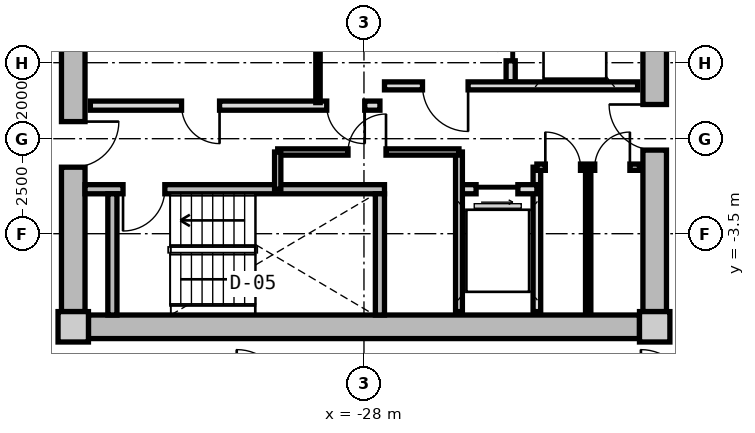
"""IFC4 building model, lengths in metres.
Left out: names, types, materials, properties, quantities, classifications, styles, units other than length and angle.
Written with IfcOpenShell. Run it as: python <this file> out.ifc"""

import sys

from ifc_helpers import new_model, si_unit, direction, frame, frame_2d, origin, origin_2d, place, context, subcontext, project, spatial, rectangle, extrude, source, transform, mapped, element, fill, save


model = new_model("IFC4")
c1 = context("Model", 3, precision=1e-05, world=origin(), true_north=direction((0.0, 1.0)))
c2 = subcontext(c1, "Body", "Model", "MODEL_VIEW")
j1 = project(units=[si_unit("LENGTHUNIT", "METRE"), si_unit("PLANEANGLEUNIT", "RADIAN")], contexts=[c1])
p1 = place(None, origin())
s1 = spatial("IfcSite", under=j1, at=p1, CompositionType="ELEMENT")
p2 = place(p1, origin())
s2 = spatial("IfcBuilding", under=s1, at=p2, CompositionType="ELEMENT")
p3 = place(p2, frame((0.0, 0.0, 180.05)))
s3 = spatial("IfcBuildingStorey", under=s2, at=p3, CompositionType="ELEMENT", Elevation=180.05)
m1 = source(origin(), c2, "Body", "SweptSolid", [
    extrude(rectangle(XDim=0.8, YDim=0.8, at=origin_2d()), origin(), (0.0, 0.0, 1.0), 3.05),
])
for number, where, z_axis, x_axis in (
    (1, (-35.65, -5.95, 0.0), (0.0, 0.0, 1.0), (1.0, 0.0, 0.0)),
    (2, (-20.35, -5.95, 0.0), (0.0, 0.0, 1.0), (1.0, 0.0, 0.0)),
):
    element("IfcColumn", number, at=place(p3, frame(where, z_axis=z_axis, x_axis=x_axis)), inside=s3, PredefinedType="COLUMN", context=c2, shape_type="MappedRepresentation", body=[
        mapped(m1, transform((0.0, 0.0, 0.0), x_axis=(1.0, 0.0, 0.0), y_axis=(0.0, 1.0, 0.0), z_axis=(0.0, 0.0, 1.0), scale=1.0)),
    ])
m2 = source(origin(), c2, "Body", "SweptSolid", [
    extrude(rectangle(XDim=14.5, YDim=0.62, at=frame_2d((7.25, 0.0))), origin(), (0.0, 0.0, 1.0), 2.81),
])
p4 = place(p3, frame((-20.75, -5.95, 0.0), z_axis=(0.0, 0.0, 1.0), x_axis=(-1.0, 0.0, 0.0)))
e3 = element("IfcWall", 3, at=p4, inside=s3, PredefinedType="SHEAR", context=c2, shape_type="MappedRepresentation", body=[
    mapped(m2, transform((0.0, 0.0, 0.0), x_axis=(1.0, 0.0, 0.0), y_axis=(0.0, 1.0, 0.0), z_axis=(0.0, 0.0, 1.0), scale=1.0)),
])
m3 = source(origin(), c2, "Body", "SweptSolid", [
    extrude(rectangle(XDim=11.1, YDim=0.62, at=frame_2d((5.55, 0.0))), origin(), (0.0, 0.0, 1.0), 2.81),
])
p5 = place(p3, frame((-35.65, -5.55, 0.0), z_axis=(0.0, 0.0, 1.0), x_axis=(0.0, 1.0, 0.0)))
e4 = element("IfcWall", 4, at=p5, inside=s3, PredefinedType="SHEAR", context=c2, shape_type="MappedRepresentation", body=[
    mapped(m3, transform((0.0, 0.0, 0.0), x_axis=(1.0, 0.0, 0.0), y_axis=(0.0, 1.0, 0.0), z_axis=(0.0, 0.0, 1.0), scale=1.0)),
])
p6 = place(p5, frame((3.8, 0.0, 0.0)))
e5 = element("IfcOpeningElement", 5, at=p6, cuts=e4, PredefinedType="OPENING", context=c2, shape_type="SweptSolid", body=[
    extrude(rectangle(XDim=1.2, YDim=2.15, at=frame_2d((0.6, 1.075))), frame((0.0, 0.32, 0.0), z_axis=(0.0, -1.0, 0.0), x_axis=(1.0, 0.0, 0.0)), (0.0, 0.0, 1.0), 0.64),
])
p7 = place(p3, frame((-20.35, 5.55, 0.0), z_axis=(0.0, 0.0, 1.0), x_axis=(0.0, -1.0, 0.0)))
e6 = element("IfcWall", 6, at=p7, inside=s3, PredefinedType="SHEAR", context=c2, shape_type="MappedRepresentation", body=[
    mapped(m3, transform((0.0, 0.0, 0.0), x_axis=(1.0, 0.0, 0.0), y_axis=(0.0, 1.0, 0.0), z_axis=(0.0, 0.0, 1.0), scale=1.0)),
])
p8 = place(p7, frame((5.65, 0.0, 0.0)))
e7 = element("IfcOpeningElement", 7, at=p8, cuts=e6, PredefinedType="OPENING", context=c2, shape_type="SweptSolid", body=[
    extrude(rectangle(XDim=1.2, YDim=2.15, at=frame_2d((0.6, 1.075))), frame((0.0, 0.32, 0.0), z_axis=(0.0, -1.0, 0.0), x_axis=(1.0, 0.0, 0.0)), (0.0, 0.0, 1.0), 0.64),
])
m4 = source(origin(), c2, "Body", "SweptSolid", [
    extrude(rectangle(XDim=7.88, YDim=0.24, at=frame_2d((3.94, 0.0))), origin(), (0.0, 0.0, 1.0), 2.81),
])
p9 = place(p3, frame((-35.34, -2.33, 0.0), z_axis=(0.0, 0.0, 1.0), x_axis=(1.0, 0.0, 0.0)))
e8 = element("IfcWall", 8, at=p9, inside=s3, PredefinedType="PARTITIONING", context=c2, shape_type="MappedRepresentation", body=[
    mapped(m4, transform((0.0, 0.0, 0.0), x_axis=(1.0, 0.0, 0.0), y_axis=(0.0, 1.0, 0.0), z_axis=(0.0, 0.0, 1.0), scale=1.0)),
])
p10 = place(p9, frame((1.0, 0.0, 0.0)))
e9 = element("IfcOpeningElement", 9, at=p10, cuts=e8, PredefinedType="OPENING", context=c2, shape_type="SweptSolid", body=[
    extrude(rectangle(XDim=1.1, YDim=2.15, at=frame_2d((0.55, 1.075))), frame((0.0, 0.13, 0.0), z_axis=(0.0, -1.0, 0.0), x_axis=(1.0, 0.0, 0.0)), (0.0, 0.0, 1.0), 0.26),
])
m5 = source(origin(), c2, "Body", "SweptSolid", [
    extrude(rectangle(XDim=3.19, YDim=0.24, at=frame_2d((1.595, 0.0))), origin(), (0.0, 0.0, 1.0), 2.81),
])
for number, where, z_axis, x_axis in (
    (10, (-34.62, -5.64, 0.0), (0.0, 0.0, 1.0), (0.0, 1.0, 0.0)),
    (11, (-27.58, -5.64, 0.0), (0.0, 0.0, 1.0), (0.0, 1.0, 0.0)),
):
    element("IfcWall", number, at=place(p3, frame(where, z_axis=z_axis, x_axis=x_axis)), inside=s3, PredefinedType="PARTITIONING", context=c2, shape_type="MappedRepresentation", body=[
        mapped(m5, transform((0.0, 0.0, 0.0), x_axis=(1.0, 0.0, 0.0), y_axis=(0.0, 1.0, 0.0), z_axis=(0.0, 0.0, 1.0), scale=1.0)),
    ])
m6 = source(origin(), c2, "Body", "SweptSolid", [
    extrude(rectangle(XDim=5.0, YDim=0.24, at=frame_2d((2.5, 0.0))), origin(), (0.0, 0.0, 1.0), 2.795),
])
p11 = place(p3, frame((-24.14, 0.5, 0.0), z_axis=(0.0, 0.0, 1.0), x_axis=(0.0, 1.0, 0.0)))
e12 = element("IfcWall", 12, at=p11, inside=s3, PredefinedType="PARTITIONING", context=c2, shape_type="MappedRepresentation", body=[
    mapped(m6, transform((0.0, 0.0, 0.0), x_axis=(1.0, 0.0, 0.0), y_axis=(0.0, 1.0, 0.0), z_axis=(0.0, 0.0, 1.0), scale=1.0)),
])
p12 = place(p11, frame((3.05, 0.0, 0.0)))
e13 = element("IfcOpeningElement", 13, at=p12, cuts=e12, PredefinedType="OPENING", context=c2, shape_type="SweptSolid", body=[
    extrude(rectangle(XDim=1.3, YDim=2.2, at=frame_2d((0.65, 1.1))), frame((0.0, 0.13, 0.0), z_axis=(0.0, -1.0, 0.0), x_axis=(1.0, 0.0, 0.0)), (0.0, 0.0, 1.0), 0.26),
])
p13 = place(p11, frame((0.55, 0.0, 0.0)))
e14 = element("IfcOpeningElement", 14, at=p13, cuts=e12, PredefinedType="OPENING", context=c2, shape_type="SweptSolid", body=[
    extrude(rectangle(XDim=1.3, YDim=2.2, at=frame_2d((0.65, 1.1))), frame((0.0, 0.13, 0.0), z_axis=(0.0, -1.0, 0.0), x_axis=(1.0, 0.0, 0.0)), (0.0, 0.0, 1.0), 0.26),
])
m7 = source(origin(), c2, "Body", "SweptSolid", [
    extrude(rectangle(XDim=6.66, YDim=0.21, at=frame_2d((3.33, 0.0))), origin(), (0.0, 0.0, 1.0), 2.795),
])
p14 = place(p3, frame((-27.46, 0.39, 0.0), z_axis=(0.0, 0.0, 1.0), x_axis=(1.0, 0.0, 0.0)))
e15 = element("IfcWall", 15, at=p14, inside=s3, PredefinedType="PARTITIONING", context=c2, shape_type="MappedRepresentation", body=[
    mapped(m7, transform((0.0, 0.0, 0.0), x_axis=(1.0, 0.0, 0.0), y_axis=(0.0, 1.0, 0.0), z_axis=(0.0, 0.0, 1.0), scale=1.0)),
])
p15 = place(p14, frame((1.0, 0.0, 0.0)))
e16 = element("IfcOpeningElement", 16, at=p15, cuts=e15, PredefinedType="OPENING", context=c2, shape_type="SweptSolid", body=[
    extrude(rectangle(XDim=1.2, YDim=2.15, at=frame_2d((0.6, 1.075))), frame((0.0, 0.115, 0.0), z_axis=(0.0, -1.0, 0.0), x_axis=(1.0, 0.0, 0.0)), (0.0, 0.0, 1.0), 0.23),
])
m8 = source(origin(), c2, "Body", "SweptSolid", [
    extrude(rectangle(XDim=7.62, YDim=0.24, at=frame_2d((3.81, 0.0))), origin(), (0.0, 0.0, 1.0), 2.795),
])
p16 = place(p3, frame((-35.2, -0.13, 0.0), z_axis=(0.0, 0.0, 1.0), x_axis=(1.0, 0.0, 0.0)))
e17 = element("IfcWall", 17, at=p16, inside=s3, PredefinedType="PARTITIONING", context=c2, shape_type="MappedRepresentation", body=[
    mapped(m8, transform((0.0, 0.0, 0.0), x_axis=(1.0, 0.0, 0.0), y_axis=(0.0, 1.0, 0.0), z_axis=(0.0, 0.0, 1.0), scale=1.0)),
])
p17 = place(p16, frame((6.22, 0.0, 0.0)))
e18 = element("IfcOpeningElement", 18, at=p17, cuts=e17, PredefinedType="OPENING", context=c2, shape_type="SweptSolid", body=[
    extrude(rectangle(XDim=1.0, YDim=2.1, at=frame_2d((0.5, 1.05))), frame((0.0, 0.13, 0.0), z_axis=(0.0, -1.0, 0.0), x_axis=(1.0, 0.0, 0.0)), (0.0, 0.0, 1.0), 0.26),
])
p18 = place(p16, frame((2.4, 0.0, 0.0)))
e19 = element("IfcOpeningElement", 19, at=p18, cuts=e17, PredefinedType="OPENING", context=c2, shape_type="SweptSolid", body=[
    extrude(rectangle(XDim=1.0, YDim=2.1, at=frame_2d((0.5, 1.05))), frame((0.0, 0.13, 0.0), z_axis=(0.0, -1.0, 0.0), x_axis=(1.0, 0.0, 0.0)), (0.0, 0.0, 1.0), 0.26),
])
m9 = source(origin(), c2, "Body", "SweptSolid", [
    extrude(rectangle(XDim=2.33, YDim=0.115, at=frame_2d((1.165, 0.0))), origin(), (0.0, 0.0, 1.0), 2.795),
])
p19 = place(p3, frame((-29.21, -0.05, 0.0), z_axis=(0.0, 0.0, 1.0), x_axis=(0.0, 1.0, 0.0)))
e20 = element("IfcWall", 20, at=p19, inside=s3, PredefinedType="PARTITIONING", context=c2, shape_type="MappedRepresentation", body=[
    mapped(m9, transform((0.0, 0.0, 0.0), x_axis=(1.0, 0.0, 0.0), y_axis=(0.0, 1.0, 0.0), z_axis=(0.0, 0.0, 1.0), scale=1.0)),
])
m10 = source(origin(), c2, "Body", "SweptSolid", [
    extrude(rectangle(XDim=3.8, YDim=0.2, at=frame_2d((1.9, 0.0))), origin(), (0.0, 0.0, 1.0), 2.795),
])
p20 = place(p3, frame((-23.45, -5.55, 0.0), z_axis=(0.0, 0.0, 1.0), x_axis=(0.0, 1.0, 0.0)))
e21 = element("IfcWall", 21, at=p20, inside=s3, PredefinedType="PARTITIONING", context=c2, shape_type="MappedRepresentation", body=[
    mapped(m10, transform((0.0, 0.0, 0.0), x_axis=(1.0, 0.0, 0.0), y_axis=(0.0, 1.0, 0.0), z_axis=(0.0, 0.0, 1.0), scale=1.0)),
])
m11 = source(origin(), c2, "Body", "SweptSolid", [
    extrude(rectangle(XDim=2.05, YDim=0.24, at=frame_2d((1.025, 0.0))), origin(), (0.0, 0.0, 1.0), 2.795),
])
p21 = place(p3, frame((-25.5, -2.33, 0.0), z_axis=(0.0, 0.0, 1.0), x_axis=(1.0, 0.0, 0.0)))
e22 = element("IfcWall", 22, at=p21, inside=s3, PredefinedType="PARTITIONING", context=c2, shape_type="MappedRepresentation", body=[
    mapped(m11, transform((0.0, 0.0, 0.0), x_axis=(1.0, 0.0, 0.0), y_axis=(0.0, 1.0, 0.0), z_axis=(0.0, 0.0, 1.0), scale=1.0)),
])
p22 = place(p21, frame((0.45, 0.0, 0.0)))
e23 = element("IfcOpeningElement", 23, at=p22, cuts=e22, PredefinedType="OPENING", context=c2, shape_type="SweptSolid", body=[
    extrude(rectangle(XDim=1.1, YDim=2.2, at=frame_2d((0.55, 1.1))), frame((0.0, 0.13, 0.0), z_axis=(0.0, -1.0, 0.0), x_axis=(1.0, 0.0, 0.0)), (0.0, 0.0, 1.0), 0.26),
])
m12 = source(origin(), c2, "Body", "SweptSolid", [
    extrude(rectangle(XDim=4.2, YDim=0.18, at=frame_2d((2.1, 0.0))), origin(), (0.0, 0.0, 1.0), 2.795),
])
p23 = place(p3, frame((-25.5, -5.55, 0.0), z_axis=(0.0, 0.0, 1.0), x_axis=(0.0, 1.0, 0.0)))
e24 = element("IfcWall", 24, at=p23, inside=s3, PredefinedType="PARTITIONING", context=c2, shape_type="MappedRepresentation", body=[
    mapped(m12, transform((0.0, 0.0, 0.0), x_axis=(1.0, 0.0, 0.0), y_axis=(0.0, 1.0, 0.0), z_axis=(0.0, 0.0, 1.0), scale=1.0)),
])
m13 = source(origin(), c2, "Body", "SweptSolid", [
    extrude(rectangle(XDim=4.77, YDim=0.165, at=frame_2d((2.385, 0.0))), origin(), (0.0, 0.0, 1.0), 2.795),
])
p24 = place(p3, frame((-30.27, -1.35, 0.0), z_axis=(0.0, 0.0, 1.0), x_axis=(1.0, 0.0, 0.0)))
e25 = element("IfcWall", 25, at=p24, inside=s3, PredefinedType="PARTITIONING", context=c2, shape_type="MappedRepresentation", body=[
    mapped(m13, transform((0.0, 0.0, 0.0), x_axis=(1.0, 0.0, 0.0), y_axis=(0.0, 1.0, 0.0), z_axis=(0.0, 0.0, 1.0), scale=1.0)),
])
p25 = place(p24, frame((1.85, 0.0, 0.0)))
e26 = element("IfcOpeningElement", 26, at=p25, cuts=e25, PredefinedType="OPENING", context=c2, shape_type="SweptSolid", body=[
    extrude(rectangle(XDim=1.0, YDim=2.1, at=frame_2d((0.5, 1.05))), frame((0.0, 0.093, 0.0), z_axis=(0.0, -1.0, 0.0), x_axis=(1.0, 0.0, 0.0)), (0.0, 0.0, 1.0), 0.185),
])
m14 = source(origin(), c2, "Body", "SweptSolid", [
    extrude(rectangle(XDim=0.98, YDim=0.165, at=frame_2d((0.49, 0.0))), origin(), (0.0, 0.0, 1.0), 2.795),
])
p26 = place(p3, frame((-30.27, -2.33, 0.0), z_axis=(0.0, 0.0, 1.0), x_axis=(0.0, 1.0, 0.0)))
e27 = element("IfcWall", 27, at=p26, inside=s3, PredefinedType="PARTITIONING", context=c2, shape_type="MappedRepresentation", body=[
    mapped(m14, transform((0.0, 0.0, 0.0), x_axis=(1.0, 0.0, 0.0), y_axis=(0.0, 1.0, 0.0), z_axis=(0.0, 0.0, 1.0), scale=1.0)),
])
m15 = source(origin(), c2, "Body", "SweptSolid", [
    extrude(rectangle(XDim=2.7, YDim=0.165, at=frame_2d((1.35, 0.0))), origin(), (0.0, 0.0, 1.0), 2.795),
])
p27 = place(p3, frame((-23.45, -1.75, 0.0), z_axis=(0.0, 0.0, 1.0), x_axis=(1.0, 0.0, 0.0)))
e28 = element("IfcWall", 28, at=p27, inside=s3, PredefinedType="PARTITIONING", context=c2, shape_type="MappedRepresentation", body=[
    mapped(m15, transform((0.0, 0.0, 0.0), x_axis=(1.0, 0.0, 0.0), y_axis=(0.0, 1.0, 0.0), z_axis=(0.0, 0.0, 1.0), scale=1.0)),
])
p28 = place(p27, frame((0.222, 0.0, 0.0)))
e29 = element("IfcOpeningElement", 29, at=p28, cuts=e28, PredefinedType="OPENING", context=c2, shape_type="SweptSolid", body=[
    extrude(rectangle(XDim=0.925, YDim=2.1, at=frame_2d((0.462, 1.05))), frame((0.0, 0.093, 0.0), z_axis=(0.0, -1.0, 0.0), x_axis=(1.0, 0.0, 0.0)), (0.0, 0.0, 1.0), 0.185),
])
p29 = place(p27, frame((1.522, 0.0, 0.0)))
e30 = element("IfcOpeningElement", 30, at=p29, cuts=e28, PredefinedType="OPENING", context=c2, shape_type="SweptSolid", body=[
    extrude(rectangle(XDim=0.925, YDim=2.1, at=frame_2d((0.462, 1.05))), frame((0.0, 0.093, 0.0), z_axis=(0.0, -1.0, 0.0), x_axis=(1.0, 0.0, 0.0)), (0.0, 0.0, 1.0), 0.185),
])
m16 = source(origin(), c2, "Body", "SweptSolid", [
    extrude(rectangle(XDim=3.8, YDim=0.14, at=frame_2d((1.9, 0.0))), origin(), (0.0, 0.0, 1.0), 2.795),
])
p30 = place(p3, frame((-22.1, -5.55, 0.0), z_axis=(0.0, 0.0, 1.0), x_axis=(0.0, 1.0, 0.0)))
e31 = element("IfcWall", 31, at=p30, inside=s3, PredefinedType="PARTITIONING", context=c2, shape_type="MappedRepresentation", body=[
    mapped(m16, transform((0.0, 0.0, 0.0), x_axis=(1.0, 0.0, 0.0), y_axis=(0.0, 1.0, 0.0), z_axis=(0.0, 0.0, 1.0), scale=1.0)),
])
m17 = source(origin(), c2, "Body", "SweptSolid", [
    extrude(rectangle(XDim=1.1, YDim=2.15, at=frame_2d((0.55, 1.075))), frame((0.0, 0.025, 0.0), z_axis=(0.0, -1.0, 0.0), x_axis=(1.0, 0.0, 0.0)), (0.0, 0.0, 1.0), 0.05),
])
p31 = place(p10, frame((1.1, 0.0, 0.0), z_axis=(0.0, 0.0, 1.0), x_axis=(-1.0, 0.0, 0.0)))
e32 = element("IfcDoor", 32, at=p31, inside=s3, OperationType="SINGLE_SWING_RIGHT", PredefinedType="DOOR", context=c2, shape_type="MappedRepresentation", body=[
    mapped(m17, transform((0.0, 0.0, 0.0), x_axis=(1.0, 0.0, 0.0), y_axis=(0.0, 1.0, 0.0), z_axis=(0.0, 0.0, 1.0), scale=1.0)),
])
fill(e9, e32)
m18 = source(origin(), c2, "Body", "SweptSolid", [
    extrude(rectangle(XDim=1.3, YDim=2.2, at=frame_2d((0.65, 1.1))), frame((0.0, 0.025, 0.0), z_axis=(0.0, -1.0, 0.0), x_axis=(1.0, 0.0, 0.0)), (0.0, 0.0, 1.0), 0.05),
])
p32 = place(p13, origin())
e33 = element("IfcDoor", 33, at=p32, inside=s3, OperationType="SLIDING_TO_RIGHT", PredefinedType="DOOR", context=c2, shape_type="MappedRepresentation", body=[
    mapped(m18, transform((0.0, 0.0, 0.0), x_axis=(1.0, 0.0, 0.0), y_axis=(0.0, 1.0, 0.0), z_axis=(0.0, 0.0, 1.0), scale=1.0)),
])
fill(e14, e33)
m19 = source(origin(), c2, "Body", "SweptSolid", [
    extrude(rectangle(XDim=1.2, YDim=2.15, at=frame_2d((0.6, 1.075))), frame((0.0, 0.025, 0.0), z_axis=(0.0, -1.0, 0.0), x_axis=(1.0, 0.0, 0.0)), (0.0, 0.0, 1.0), 0.05),
])
p33 = place(p15, frame((1.2, 0.0, 0.0), z_axis=(0.0, 0.0, 1.0), x_axis=(-1.0, 0.0, 0.0)))
e34 = element("IfcDoor", 34, at=p33, inside=s3, OperationType="SINGLE_SWING_LEFT", PredefinedType="DOOR", context=c2, shape_type="MappedRepresentation", body=[
    mapped(m19, transform((0.0, 0.0, 0.0), x_axis=(1.0, 0.0, 0.0), y_axis=(0.0, 1.0, 0.0), z_axis=(0.0, 0.0, 1.0), scale=1.0)),
])
fill(e16, e34)
p34 = place(p6, frame((1.2, 0.0, 0.0), z_axis=(0.0, 0.0, 1.0), x_axis=(-1.0, 0.0, 0.0)))
e35 = element("IfcDoor", 35, at=p34, inside=s3, OperationType="SINGLE_SWING_LEFT", PredefinedType="DOOR", context=c2, shape_type="MappedRepresentation", body=[
    mapped(m19, transform((0.0, 0.0, 0.0), x_axis=(1.0, 0.0, 0.0), y_axis=(0.0, 1.0, 0.0), z_axis=(0.0, 0.0, 1.0), scale=1.0)),
])
fill(e5, e35)
p35 = place(p8, frame((1.2, 0.0, 0.0), z_axis=(0.0, 0.0, 1.0), x_axis=(-1.0, 0.0, 0.0)))
e36 = element("IfcDoor", 36, at=p35, inside=s3, OperationType="SINGLE_SWING_RIGHT", PredefinedType="DOOR", context=c2, shape_type="MappedRepresentation", body=[
    mapped(m19, transform((0.0, 0.0, 0.0), x_axis=(1.0, 0.0, 0.0), y_axis=(0.0, 1.0, 0.0), z_axis=(0.0, 0.0, 1.0), scale=1.0)),
])
fill(e7, e36)
m20 = source(origin(), c2, "Body", "SweptSolid", [
    extrude(rectangle(XDim=1.0, YDim=2.1, at=frame_2d((0.5, 1.05))), frame((0.0, 0.025, 0.0), z_axis=(0.0, -1.0, 0.0), x_axis=(1.0, 0.0, 0.0)), (0.0, 0.0, 1.0), 0.05),
])
p36 = place(p17, frame((1.0, 0.0, 0.0), z_axis=(0.0, 0.0, 1.0), x_axis=(-1.0, 0.0, 0.0)))
e37 = element("IfcDoor", 37, at=p36, inside=s3, OperationType="SINGLE_SWING_LEFT", PredefinedType="DOOR", context=c2, shape_type="MappedRepresentation", body=[
    mapped(m20, transform((0.0, 0.0, 0.0), x_axis=(1.0, 0.0, 0.0), y_axis=(0.0, 1.0, 0.0), z_axis=(0.0, 0.0, 1.0), scale=1.0)),
])
fill(e18, e37)
p37 = place(p18, frame((1.0, 0.0, 0.0), z_axis=(0.0, 0.0, 1.0), x_axis=(-1.0, 0.0, 0.0)))
e38 = element("IfcDoor", 38, at=p37, inside=s3, OperationType="SINGLE_SWING_LEFT", PredefinedType="DOOR", context=c2, shape_type="MappedRepresentation", body=[
    mapped(m20, transform((0.0, 0.0, 0.0), x_axis=(1.0, 0.0, 0.0), y_axis=(0.0, 1.0, 0.0), z_axis=(0.0, 0.0, 1.0), scale=1.0)),
])
fill(e19, e38)
m21 = source(origin(), c2, "Body", "SweptSolid", [
    extrude(rectangle(XDim=1.1, YDim=2.2, at=frame_2d((0.55, 1.1))), frame((0.0, 0.025, 0.0), z_axis=(0.0, -1.0, 0.0), x_axis=(1.0, 0.0, 0.0)), (0.0, 0.0, 1.0), 0.05),
])
p38 = place(p22, frame((1.1, 0.0, 0.0), z_axis=(0.0, 0.0, 1.0), x_axis=(-1.0, 0.0, 0.0)))
e39 = element("IfcDoor", 39, at=p38, inside=s3, OperationType="SLIDING_TO_RIGHT", PredefinedType="DOOR", context=c2, shape_type="MappedRepresentation", body=[
    mapped(m21, transform((0.0, 0.0, 0.0), x_axis=(1.0, 0.0, 0.0), y_axis=(0.0, 1.0, 0.0), z_axis=(0.0, 0.0, 1.0), scale=1.0)),
])
fill(e23, e39)
p39 = place(p25, origin())
e40 = element("IfcDoor", 40, at=p39, inside=s3, OperationType="SINGLE_SWING_RIGHT", PredefinedType="DOOR", context=c2, shape_type="MappedRepresentation", body=[
    mapped(m20, transform((0.0, 0.0, 0.0), x_axis=(1.0, 0.0, 0.0), y_axis=(0.0, 1.0, 0.0), z_axis=(0.0, 0.0, 1.0), scale=1.0)),
])
fill(e26, e40)
m22 = source(origin(), c2, "Body", "SweptSolid", [
    extrude(rectangle(XDim=0.925, YDim=2.1, at=frame_2d((0.462, 1.05))), frame((0.0, 0.025, 0.0), z_axis=(0.0, -1.0, 0.0), x_axis=(1.0, 0.0, 0.0)), (0.0, 0.0, 1.0), 0.05),
])
p40 = place(p28, origin())
e41 = element("IfcDoor", 41, at=p40, inside=s3, OperationType="SINGLE_SWING_LEFT", PredefinedType="DOOR", context=c2, shape_type="MappedRepresentation", body=[
    mapped(m22, transform((0.0, 0.0, 0.0), x_axis=(1.0, 0.0, 0.0), y_axis=(0.0, 1.0, 0.0), z_axis=(0.0, 0.0, 1.0), scale=1.0)),
])
fill(e29, e41)
p41 = place(p29, origin())
e42 = element("IfcDoor", 42, at=p41, inside=s3, OperationType="SINGLE_SWING_RIGHT", PredefinedType="DOOR", context=c2, shape_type="MappedRepresentation", body=[
    mapped(m22, transform((0.0, 0.0, 0.0), x_axis=(1.0, 0.0, 0.0), y_axis=(0.0, 1.0, 0.0), z_axis=(0.0, 0.0, 1.0), scale=1.0)),
])
fill(e30, e42)
save(model, sys.argv[1])
